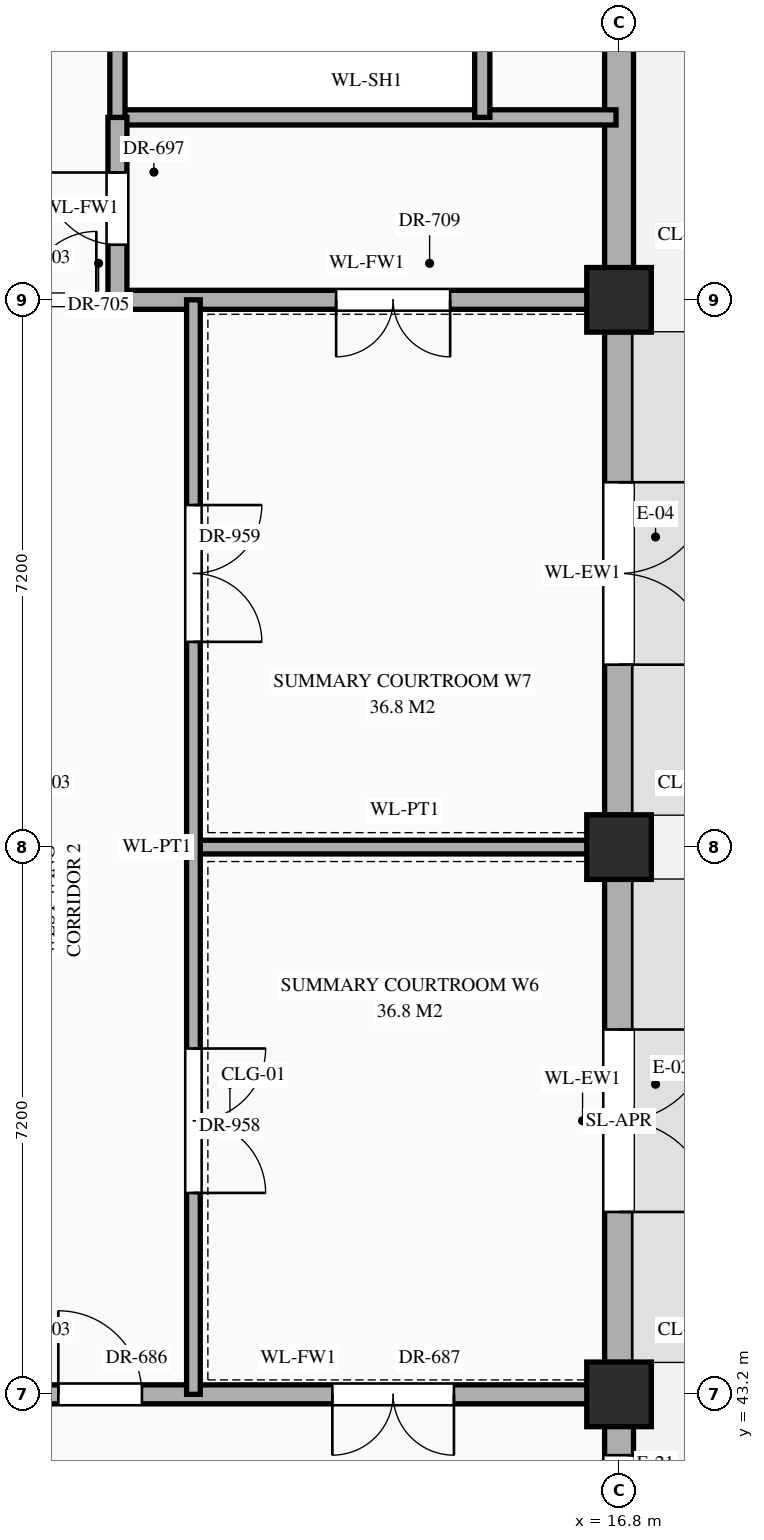
"""IFC4 building model, lengths in metres.
Left out: names, types, materials, properties, quantities, classifications, styles, units other than length and angle.
Written with IfcOpenShell. Run it as: python <this file> out.ifc"""

import sys

from ifc_helpers import new_model, si_unit, direction, frame, frame_2d, origin, origin_2d, place, context, subcontext, project, spatial, rectangle, extrude, element, fill, save


model = new_model("IFC4")
c1 = context("Model", 3, precision=1e-05, world=origin(), true_north=direction((0.0, 1.0)))
c2 = subcontext(c1, "Body", "Model", "MODEL_VIEW")
j1 = project(units=[si_unit("LENGTHUNIT", "METRE"), si_unit("PLANEANGLEUNIT", "RADIAN")], contexts=[c1])
p1 = place(None, origin())
s1 = spatial("IfcSite", under=j1, at=p1, CompositionType="ELEMENT")
p2 = place(p1, origin())
s2 = spatial("IfcBuilding", under=s1, at=p2, CompositionType="ELEMENT")
p3 = place(p2, origin())
s3 = spatial("IfcBuildingStorey", under=s2, at=p3, CompositionType="ELEMENT", Elevation=0.0)
for number, where, z_axis, x_axis in (
    (1, (16.8, 43.2, 0.0), (0.0, 0.0, 1.0), (1.0, 0.0, 0.0)),
    (2, (16.8, 50.4, 0.0), (0.0, 0.0, 1.0), (1.0, 0.0, 0.0)),
    (3, (16.8, 57.6, 0.0), (0.0, 0.0, 1.0), (1.0, 0.0, 0.0)),
):
    element("IfcColumn", number, at=place(p3, frame(where, z_axis=z_axis, x_axis=x_axis)), inside=s3, PredefinedType="COLUMN", context=c2, shape_type="SweptSolid", body=[
        extrude(rectangle(XDim=0.85, YDim=0.85, at=origin_2d()), origin(), (0.0, 0.0, 1.0), 5.4),
    ])
p4 = place(p3, frame((16.8, 36.42, 0.0), z_axis=(0.0, 0.0, 1.0), x_axis=(0.0, 1.0, 0.0)))
e4 = element("IfcWall", 4, at=p4, inside=s3, PredefinedType="STANDARD", context=c2, shape_type="SweptSolid", body=[
    extrude(rectangle(XDim=6.36, YDim=0.38, at=frame_2d((3.18, 0.0))), origin(), (0.0, 0.0, 1.0), 4.47),
])
p5 = place(p4, frame((4.78, 0.0, 0.0)))
e5 = element("IfcOpeningElement", 5, at=p5, cuts=e4, PredefinedType="OPENING", context=c2, shape_type="SweptSolid", body=[
    extrude(rectangle(XDim=1.2, YDim=2.2, at=frame_2d((0.6, 1.1))), frame((0.0, 0.202, 0.0), z_axis=(0.0, -1.0, 0.0), x_axis=(1.0, 0.0, 0.0)), (0.0, 0.0, 1.0), 0.404),
])
p6 = place(p3, frame((16.8, 43.62, 0.0), z_axis=(0.0, 0.0, 1.0), x_axis=(0.0, 1.0, 0.0)))
e6 = element("IfcWall", 6, at=p6, inside=s3, PredefinedType="STANDARD", context=c2, shape_type="SweptSolid", body=[
    extrude(rectangle(XDim=6.36, YDim=0.38, at=frame_2d((3.18, 0.0))), origin(), (0.0, 0.0, 1.0), 4.47),
])
p7 = place(p6, frame((1.98, 0.0, 0.0)))
e7 = element("IfcOpeningElement", 7, at=p7, cuts=e6, PredefinedType="OPENING", context=c2, shape_type="SweptSolid", body=[
    extrude(rectangle(XDim=2.4, YDim=2.4, at=frame_2d((1.2, 1.2))), frame((0.0, 0.202, 0.0), z_axis=(0.0, -1.0, 0.0), x_axis=(1.0, 0.0, 0.0)), (0.0, 0.0, 1.0), 0.404),
])
p8 = place(p3, frame((16.8, 50.82, 0.0), z_axis=(0.0, 0.0, 1.0), x_axis=(0.0, 1.0, 0.0)))
e8 = element("IfcWall", 8, at=p8, inside=s3, PredefinedType="STANDARD", context=c2, shape_type="SweptSolid", body=[
    extrude(rectangle(XDim=6.36, YDim=0.38, at=frame_2d((3.18, 0.0))), origin(), (0.0, 0.0, 1.0), 4.47),
])
p9 = place(p8, frame((1.98, 0.0, 0.0)))
e9 = element("IfcOpeningElement", 9, at=p9, cuts=e8, PredefinedType="OPENING", context=c2, shape_type="SweptSolid", body=[
    extrude(rectangle(XDim=2.4, YDim=2.4, at=frame_2d((1.2, 1.2))), frame((0.0, 0.202, 0.0), z_axis=(0.0, -1.0, 0.0), x_axis=(1.0, 0.0, 0.0)), (0.0, 0.0, 1.0), 0.404),
])
p10 = place(p3, frame((16.8, 58.02, 0.0), z_axis=(0.0, 0.0, 1.0), x_axis=(0.0, 1.0, 0.0)))
e10 = element("IfcWall", 10, at=p10, inside=s3, PredefinedType="STANDARD", context=c2, shape_type="SweptSolid", body=[
    extrude(rectangle(XDim=6.36, YDim=0.38, at=frame_2d((3.18, 0.0))), origin(), (0.0, 0.0, 1.0), 4.47),
])
p11 = place(p3, frame((8.4, 43.2, 0.0), z_axis=(0.0, 0.0, 1.0), x_axis=(1.0, 0.0, 0.0)))
e11 = element("IfcWall", 11, at=p11, inside=s3, PredefinedType="STANDARD", context=c2, shape_type="SweptSolid", body=[
    extrude(rectangle(XDim=8.36, YDim=0.25, at=frame_2d((4.18, 0.0))), origin(), (0.0, 0.0, 1.0), 4.27),
])
p12 = place(p11, frame((1.022, 0.0, 0.0)))
e12 = element("IfcOpeningElement", 12, at=p12, cuts=e11, PredefinedType="OPENING", context=c2, shape_type="SweptSolid", body=[
    extrude(rectangle(XDim=1.1, YDim=2.2, at=frame_2d((0.55, 1.1))), frame((0.0, 0.137, 0.0), z_axis=(0.0, -1.0, 0.0), x_axis=(1.0, 0.0, 0.0)), (0.0, 0.0, 1.0), 0.274),
])
p13 = place(p11, frame((4.627, 0.0, 0.0)))
e13 = element("IfcOpeningElement", 13, at=p13, cuts=e11, PredefinedType="OPENING", context=c2, shape_type="SweptSolid", body=[
    extrude(rectangle(XDim=1.6, YDim=2.3, at=frame_2d((0.8, 1.15))), frame((0.0, 0.137, 0.0), z_axis=(0.0, -1.0, 0.0), x_axis=(1.0, 0.0, 0.0)), (0.0, 0.0, 1.0), 0.274),
])
p14 = place(p3, frame((11.2, 50.4, 0.0), z_axis=(0.0, 0.0, 1.0), x_axis=(1.0, 0.0, 0.0)))
e14 = element("IfcWall", 14, at=p14, inside=s3, PredefinedType="STANDARD", context=c2, shape_type="SweptSolid", body=[
    extrude(rectangle(XDim=5.56, YDim=0.18, at=frame_2d((2.78, 0.0))), origin(), (0.0, 0.0, 1.0), 4.27),
])
p15 = place(p3, frame((0.04, 57.6, 0.0), z_axis=(0.0, 0.0, 1.0), x_axis=(1.0, 0.0, 0.0)))
e15 = element("IfcWall", 15, at=p15, inside=s3, PredefinedType="STANDARD", context=c2, shape_type="SweptSolid", body=[
    extrude(rectangle(XDim=10.16, YDim=0.1, at=frame_2d((5.08, 0.0))), origin(), (0.0, 0.0, 1.0), 4.27),
])
p16 = place(p15, frame((8.982, 0.0, 0.0)))
e16 = element("IfcOpeningElement", 16, at=p16, cuts=e15, PredefinedType="OPENING", context=c2, shape_type="SweptSolid", body=[
    extrude(rectangle(XDim=0.9, YDim=2.15, at=frame_2d((0.45, 1.075))), frame((0.0, 0.062, 0.0), z_axis=(0.0, -1.0, 0.0), x_axis=(1.0, 0.0, 0.0)), (0.0, 0.0, 1.0), 0.124),
])
p17 = place(p3, frame((10.2, 57.6, 0.0), z_axis=(0.0, 0.0, 1.0), x_axis=(1.0, 0.0, 0.0)))
e17 = element("IfcWall", 17, at=p17, inside=s3, PredefinedType="STANDARD", context=c2, shape_type="SweptSolid", body=[
    extrude(rectangle(XDim=6.56, YDim=0.25, at=frame_2d((3.28, 0.0))), origin(), (0.0, 0.0, 1.0), 4.27),
])
p18 = place(p17, frame((2.877, 0.0, 0.0)))
e18 = element("IfcOpeningElement", 18, at=p18, cuts=e17, PredefinedType="OPENING", context=c2, shape_type="SweptSolid", body=[
    extrude(rectangle(XDim=1.5, YDim=2.25, at=frame_2d((0.75, 1.125))), frame((0.0, 0.137, 0.0), z_axis=(0.0, -1.0, 0.0), x_axis=(1.0, 0.0, 0.0)), (0.0, 0.0, 1.0), 0.274),
])
p19 = place(p3, frame((10.2, 60.0, 0.0), z_axis=(0.0, 0.0, 1.0), x_axis=(1.0, 0.0, 0.0)))
e19 = element("IfcWall", 19, at=p19, inside=s3, PredefinedType="STANDARD", context=c2, shape_type="SweptSolid", body=[
    extrude(rectangle(XDim=6.56, YDim=0.2, at=frame_2d((3.28, 0.0))), origin(), (0.0, 0.0, 1.0), 5.12),
])
p20 = place(p3, frame((10.2, 57.6, 0.0), z_axis=(0.0, 0.0, 1.0), x_axis=(0.0, 1.0, 0.0)))
e20 = element("IfcWall", 20, at=p20, inside=s3, PredefinedType="STANDARD", context=c2, shape_type="SweptSolid", body=[
    extrude(rectangle(XDim=2.4, YDim=0.25, at=frame_2d((1.2, 0.0))), origin(), (0.0, 0.0, 1.0), 5.12),
])
p21 = place(p20, frame((0.725, 0.0, 0.0)))
e21 = element("IfcOpeningElement", 21, at=p21, cuts=e20, PredefinedType="OPENING", context=c2, shape_type="SweptSolid", body=[
    extrude(rectangle(XDim=0.95, YDim=2.15, at=frame_2d((0.475, 1.075))), frame((0.0, 0.137, 0.0), z_axis=(0.0, -1.0, 0.0), x_axis=(1.0, 0.0, 0.0)), (0.0, 0.0, 1.0), 0.274),
])
p22 = place(p3, frame((10.2, 60.0, 0.0), z_axis=(0.0, 0.0, 1.0), x_axis=(0.0, 1.0, 0.0)))
e22 = element("IfcWall", 22, at=p22, inside=s3, PredefinedType="STANDARD", context=c2, shape_type="SweptSolid", body=[
    extrude(rectangle(XDim=47.96, YDim=0.2, at=frame_2d((23.98, 0.0))), origin(), (0.0, 0.0, 1.0), 5.12),
])
p23 = place(p3, frame((11.2, 43.2, 0.0), z_axis=(0.0, 0.0, 1.0), x_axis=(0.0, 1.0, 0.0)))
e23 = element("IfcWall", 23, at=p23, inside=s3, PredefinedType="STANDARD", context=c2, shape_type="SweptSolid", body=[
    extrude(rectangle(XDim=14.4, YDim=0.18, at=frame_2d((7.2, 0.0))), origin(), (0.0, 0.0, 1.0), 5.12),
])
p24 = place(p23, frame((2.65, 0.0, 0.0)))
e24 = element("IfcOpeningElement", 24, at=p24, cuts=e23, PredefinedType="OPENING", context=c2, shape_type="SweptSolid", body=[
    extrude(rectangle(XDim=1.9, YDim=2.5, at=frame_2d((0.95, 1.25))), frame((0.0, 0.102, 0.0), z_axis=(0.0, -1.0, 0.0), x_axis=(1.0, 0.0, 0.0)), (0.0, 0.0, 1.0), 0.204),
])
p25 = place(p23, frame((9.9, 0.0, 0.0)))
e25 = element("IfcOpeningElement", 25, at=p25, cuts=e23, PredefinedType="OPENING", context=c2, shape_type="SweptSolid", body=[
    extrude(rectangle(XDim=1.8, YDim=2.5, at=frame_2d((0.9, 1.25))), frame((0.0, 0.102, 0.0), z_axis=(0.0, -1.0, 0.0), x_axis=(1.0, 0.0, 0.0)), (0.0, 0.0, 1.0), 0.204),
])
p26 = place(p3, frame((15.0, 60.0, 0.0), z_axis=(0.0, 0.0, 1.0), x_axis=(0.0, 1.0, 0.0)))
e26 = element("IfcWall", 26, at=p26, inside=s3, PredefinedType="STANDARD", context=c2, shape_type="SweptSolid", body=[
    extrude(rectangle(XDim=47.96, YDim=0.2, at=frame_2d((23.98, 0.0))), origin(), (0.0, 0.0, 1.0), 5.12),
])
p27 = place(p5, frame((1.2, 0.0, 0.0), z_axis=(0.0, 0.0, 1.0), x_axis=(-1.0, 0.0, 0.0)))
e27 = element("IfcDoor", 27, at=p27, inside=s3, OperationType="SINGLE_SWING_RIGHT", PredefinedType="DOOR", context=c2, shape_type="SweptSolid", body=[
    extrude(rectangle(XDim=1.2, YDim=2.2, at=frame_2d((0.6, 1.1))), frame((0.0, 0.025, 0.0), z_axis=(0.0, -1.0, 0.0), x_axis=(1.0, 0.0, 0.0)), (0.0, 0.0, 1.0), 0.05),
])
fill(e5, e27)
p28 = place(p7, frame((2.4, 0.0, 0.0), z_axis=(0.0, 0.0, 1.0), x_axis=(-1.0, 0.0, 0.0)))
e28 = element("IfcDoor", 28, at=p28, inside=s3, OperationType="DOUBLE_DOOR_SINGLE_SWING", PredefinedType="DOOR", context=c2, shape_type="SweptSolid", body=[
    extrude(rectangle(XDim=2.4, YDim=2.4, at=frame_2d((1.2, 1.2))), frame((0.0, 0.025, 0.0), z_axis=(0.0, -1.0, 0.0), x_axis=(1.0, 0.0, 0.0)), (0.0, 0.0, 1.0), 0.05),
])
fill(e7, e28)
p29 = place(p9, frame((2.4, 0.0, 0.0), z_axis=(0.0, 0.0, 1.0), x_axis=(-1.0, 0.0, 0.0)))
e29 = element("IfcDoor", 29, at=p29, inside=s3, OperationType="DOUBLE_DOOR_SINGLE_SWING", PredefinedType="DOOR", context=c2, shape_type="SweptSolid", body=[
    extrude(rectangle(XDim=2.4, YDim=2.4, at=frame_2d((1.2, 1.2))), frame((0.0, 0.025, 0.0), z_axis=(0.0, -1.0, 0.0), x_axis=(1.0, 0.0, 0.0)), (0.0, 0.0, 1.0), 0.05),
])
fill(e9, e29)
p30 = place(p12, origin())
e30 = element("IfcDoor", 30, at=p30, inside=s3, OperationType="SINGLE_SWING_LEFT", PredefinedType="DOOR", context=c2, shape_type="SweptSolid", body=[
    extrude(rectangle(XDim=1.1, YDim=2.2, at=frame_2d((0.55, 1.1))), frame((0.0, 0.025, 0.0), z_axis=(0.0, -1.0, 0.0), x_axis=(1.0, 0.0, 0.0)), (0.0, 0.0, 1.0), 0.05),
])
fill(e12, e30)
p31 = place(p13, frame((1.6, 0.0, 0.0), z_axis=(0.0, 0.0, 1.0), x_axis=(-1.0, 0.0, 0.0)))
e31 = element("IfcDoor", 31, at=p31, inside=s3, OperationType="DOUBLE_DOOR_SINGLE_SWING", PredefinedType="DOOR", context=c2, shape_type="SweptSolid", body=[
    extrude(rectangle(XDim=1.6, YDim=2.3, at=frame_2d((0.8, 1.15))), frame((0.0, 0.025, 0.0), z_axis=(0.0, -1.0, 0.0), x_axis=(1.0, 0.0, 0.0)), (0.0, 0.0, 1.0), 0.05),
])
fill(e13, e31)
p32 = place(p21, origin())
e32 = element("IfcDoor", 32, at=p32, inside=s3, OperationType="SINGLE_SWING_RIGHT", PredefinedType="DOOR", context=c2, shape_type="SweptSolid", body=[
    extrude(rectangle(XDim=0.95, YDim=2.15, at=frame_2d((0.475, 1.075))), frame((0.0, 0.025, 0.0), z_axis=(0.0, -1.0, 0.0), x_axis=(1.0, 0.0, 0.0)), (0.0, 0.0, 1.0), 0.05),
])
fill(e21, e32)
p33 = place(p16, origin())
e33 = element("IfcDoor", 33, at=p33, inside=s3, OperationType="SINGLE_SWING_RIGHT", PredefinedType="DOOR", context=c2, shape_type="SweptSolid", body=[
    extrude(rectangle(XDim=0.9, YDim=2.15, at=frame_2d((0.45, 1.075))), frame((0.0, 0.025, 0.0), z_axis=(0.0, -1.0, 0.0), x_axis=(1.0, 0.0, 0.0)), (0.0, 0.0, 1.0), 0.05),
])
fill(e16, e33)
p34 = place(p18, frame((1.5, 0.0, 0.0), z_axis=(0.0, 0.0, 1.0), x_axis=(-1.0, 0.0, 0.0)))
e34 = element("IfcDoor", 34, at=p34, inside=s3, OperationType="DOUBLE_DOOR_SINGLE_SWING", PredefinedType="DOOR", context=c2, shape_type="SweptSolid", body=[
    extrude(rectangle(XDim=1.5, YDim=2.25, at=frame_2d((0.75, 1.125))), frame((0.0, 0.025, 0.0), z_axis=(0.0, -1.0, 0.0), x_axis=(1.0, 0.0, 0.0)), (0.0, 0.0, 1.0), 0.05),
])
fill(e18, e34)
p35 = place(p24, frame((1.9, 0.0, 0.0), z_axis=(0.0, 0.0, 1.0), x_axis=(-1.0, 0.0, 0.0)))
e35 = element("IfcDoor", 35, at=p35, inside=s3, OperationType="DOUBLE_DOOR_SINGLE_SWING", PredefinedType="DOOR", context=c2, shape_type="SweptSolid", body=[
    extrude(rectangle(XDim=1.9, YDim=2.5, at=frame_2d((0.95, 1.25))), frame((0.0, 0.025, 0.0), z_axis=(0.0, -1.0, 0.0), x_axis=(1.0, 0.0, 0.0)), (0.0, 0.0, 1.0), 0.05),
])
fill(e24, e35)
p36 = place(p25, frame((1.8, 0.0, 0.0), z_axis=(0.0, 0.0, 1.0), x_axis=(-1.0, 0.0, 0.0)))
e36 = element("IfcDoor", 36, at=p36, inside=s3, OperationType="DOUBLE_DOOR_SINGLE_SWING", PredefinedType="DOOR", context=c2, shape_type="SweptSolid", body=[
    extrude(rectangle(XDim=1.8, YDim=2.5, at=frame_2d((0.9, 1.25))), frame((0.0, 0.025, 0.0), z_axis=(0.0, -1.0, 0.0), x_axis=(1.0, 0.0, 0.0)), (0.0, 0.0, 1.0), 0.05),
])
fill(e25, e36)
save(model, sys.argv[1])
